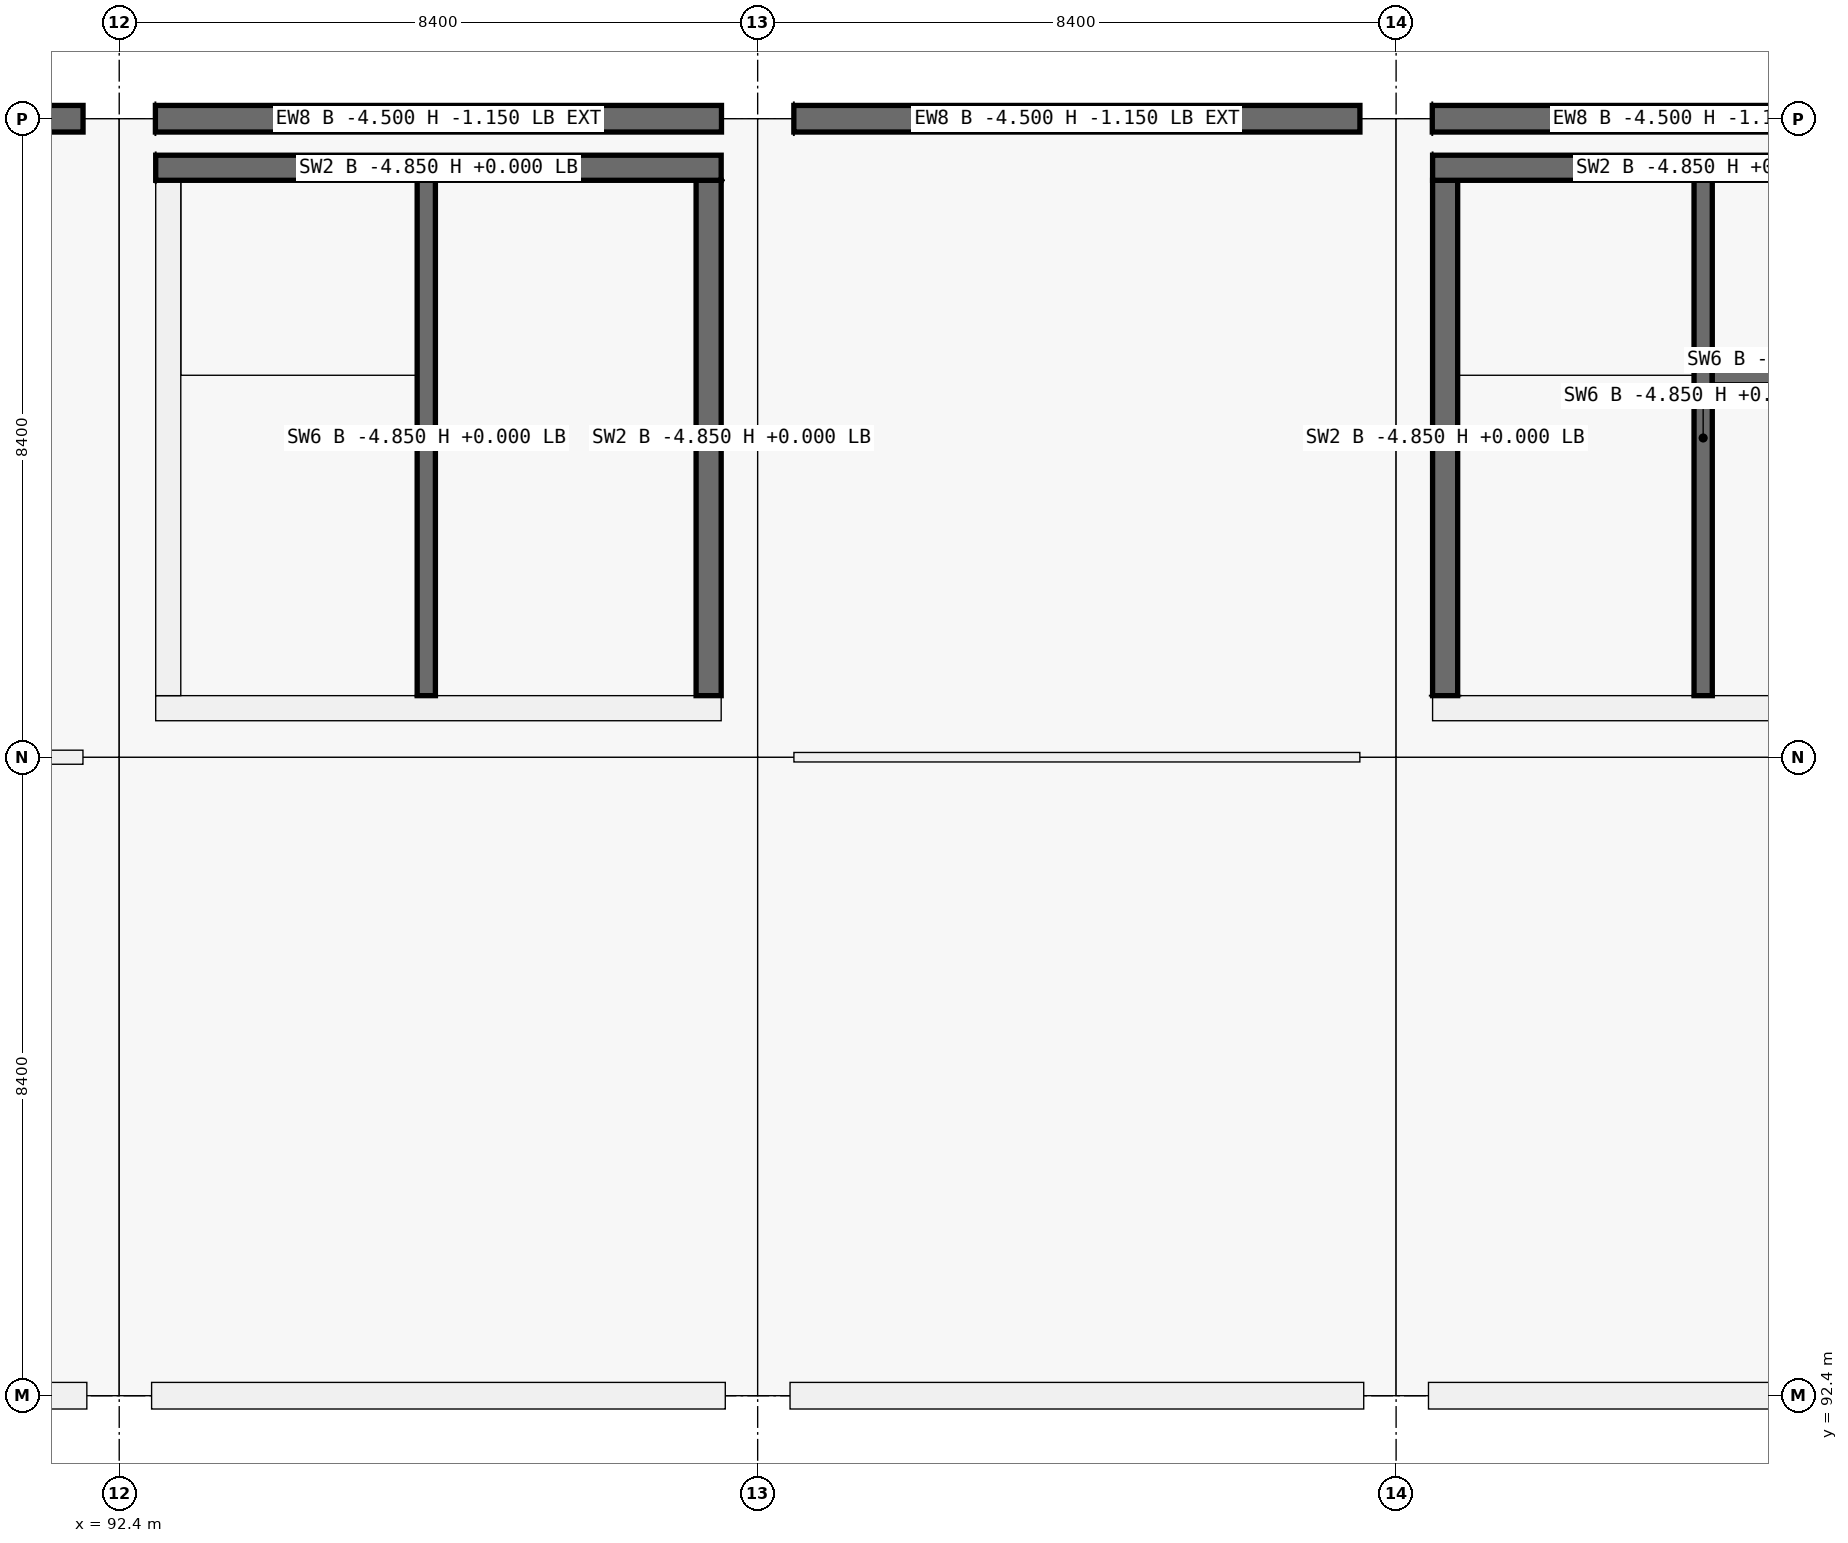
"""IFC4 building model, lengths in metres.
Left out: names, types, materials, properties, quantities, classifications, styles, units other than length and angle.
Written with IfcOpenShell. Run it as: python <this file> out.ifc"""

import sys

from ifc_helpers import new_model, si_unit, direction, frame, frame_2d, origin, origin_2d, place, context, subcontext, project, spatial, rectangle, extrude, element, fill, save


model = new_model("IFC4")
c1 = context("Model", 3, precision=1e-05, world=origin(), true_north=direction((0.0, 1.0)))
c2 = subcontext(c1, "Body", "Model", "MODEL_VIEW")
j1 = project(units=[si_unit("LENGTHUNIT", "METRE"), si_unit("PLANEANGLEUNIT", "RADIAN")], contexts=[c1])
p1 = place(None, origin())
s1 = spatial("IfcSite", under=j1, at=p1, CompositionType="ELEMENT")
p2 = place(p1, origin())
s2 = spatial("IfcBuilding", under=s1, at=p2, CompositionType="ELEMENT")
p3 = place(p2, frame((0.0, 0.0, -4.5)))
s3 = spatial("IfcBuildingStorey", under=s2, at=p3, CompositionType="ELEMENT", Elevation=-4.5)
p4 = place(p3, frame((92.4, 92.4, -0.35), z_axis=(0.0, 0.0, 1.0), x_axis=(1.0, 0.0, 0.0)))
e1 = element("IfcColumn", 1, at=p4, inside=s3, PredefinedType="COLUMN", context=c2, shape_type="SweptSolid", body=[
    extrude(rectangle(XDim=0.85, YDim=0.85, at=origin_2d()), origin(), (0.0, 0.0, 1.0), 4.5),
])
for number, where, z_axis, x_axis in (
    (2, (92.4, 100.8, -0.35), (0.0, 0.0, 1.0), (1.0, 0.0, 0.0)),
    (3, (92.4, 109.2, -0.35), (0.0, 0.0, 1.0), (1.0, 0.0, 0.0)),
):
    element("IfcColumn", number, at=place(p3, frame(where, z_axis=z_axis, x_axis=x_axis)), inside=s3, PredefinedType="COLUMN", context=c2, shape_type="SweptSolid", body=[
        extrude(rectangle(XDim=0.95, YDim=0.95, at=origin_2d()), origin(), (0.0, 0.0, 1.0), 4.85),
    ])
p5 = place(p3, frame((100.8, 92.4, -0.35), z_axis=(0.0, 0.0, 1.0), x_axis=(1.0, 0.0, 0.0)))
e4 = element("IfcColumn", 4, at=p5, inside=s3, PredefinedType="COLUMN", context=c2, shape_type="SweptSolid", body=[
    extrude(rectangle(XDim=0.85, YDim=0.85, at=origin_2d()), origin(), (0.0, 0.0, 1.0), 4.5),
])
for number, where, z_axis, x_axis in (
    (5, (100.8, 100.8, -0.35), (0.0, 0.0, 1.0), (1.0, 0.0, 0.0)),
    (6, (100.8, 109.2, -0.35), (0.0, 0.0, 1.0), (1.0, 0.0, 0.0)),
):
    element("IfcColumn", number, at=place(p3, frame(where, z_axis=z_axis, x_axis=x_axis)), inside=s3, PredefinedType="COLUMN", context=c2, shape_type="SweptSolid", body=[
        extrude(rectangle(XDim=0.95, YDim=0.95, at=origin_2d()), origin(), (0.0, 0.0, 1.0), 4.85),
    ])
p6 = place(p3, frame((109.2, 92.4, -0.35), z_axis=(0.0, 0.0, 1.0), x_axis=(1.0, 0.0, 0.0)))
e7 = element("IfcColumn", 7, at=p6, inside=s3, PredefinedType="COLUMN", context=c2, shape_type="SweptSolid", body=[
    extrude(rectangle(XDim=0.85, YDim=0.85, at=origin_2d()), origin(), (0.0, 0.0, 1.0), 4.5),
])
for number, where, z_axis, x_axis in (
    (8, (109.2, 100.8, -0.35), (0.0, 0.0, 1.0), (1.0, 0.0, 0.0)),
    (9, (109.2, 109.2, -0.35), (0.0, 0.0, 1.0), (1.0, 0.0, 0.0)),
):
    element("IfcColumn", number, at=place(p3, frame(where, z_axis=z_axis, x_axis=x_axis)), inside=s3, PredefinedType="COLUMN", context=c2, shape_type="SweptSolid", body=[
        extrude(rectangle(XDim=0.95, YDim=0.95, at=origin_2d()), origin(), (0.0, 0.0, 1.0), 4.85),
    ])
p7 = place(p3, frame((91.974, 92.4, 0.0), z_axis=(0.0, 0.0, 1.0), x_axis=(-1.0, 0.0, 0.0)))
e10 = element("IfcWall", 10, at=p7, inside=s3, PredefinedType="SOLIDWALL", context=c2, shape_type="SweptSolid", body=[
    extrude(rectangle(XDim=7.548, YDim=0.35, at=frame_2d((3.774, 0.0))), origin(), (0.0, 0.0, 1.0), 3.35),
])
p8 = place(p3, frame((84.476, 109.2, 0.0), z_axis=(0.0, 0.0, 1.0), x_axis=(1.0, 0.0, 0.0)))
e11 = element("IfcWall", 11, at=p8, inside=s3, PredefinedType="SOLIDWALL", context=c2, shape_type="SweptSolid", body=[
    extrude(rectangle(XDim=7.448, YDim=0.35, at=frame_2d((3.724, 0.0))), origin(), (0.0, 0.0, 1.0), 3.35),
])
p9 = place(p3, frame((100.374, 92.4, 0.0), z_axis=(0.0, 0.0, 1.0), x_axis=(-1.0, 0.0, 0.0)))
e12 = element("IfcWall", 12, at=p9, inside=s3, PredefinedType="SOLIDWALL", context=c2, shape_type="SweptSolid", body=[
    extrude(rectangle(XDim=7.548, YDim=0.35, at=frame_2d((3.774, 0.0))), origin(), (0.0, 0.0, 1.0), 3.35),
])
p10 = place(p3, frame((92.876, 109.2, 0.0), z_axis=(0.0, 0.0, 1.0), x_axis=(1.0, 0.0, 0.0)))
e13 = element("IfcWall", 13, at=p10, inside=s3, PredefinedType="SOLIDWALL", context=c2, shape_type="SweptSolid", body=[
    extrude(rectangle(XDim=7.448, YDim=0.35, at=frame_2d((3.724, 0.0))), origin(), (0.0, 0.0, 1.0), 3.35),
])
p11 = place(p3, frame((108.774, 92.4, 0.0), z_axis=(0.0, 0.0, 1.0), x_axis=(-1.0, 0.0, 0.0)))
e14 = element("IfcWall", 14, at=p11, inside=s3, PredefinedType="SOLIDWALL", context=c2, shape_type="SweptSolid", body=[
    extrude(rectangle(XDim=7.548, YDim=0.35, at=frame_2d((3.774, 0.0))), origin(), (0.0, 0.0, 1.0), 3.35),
])
p12 = place(p3, frame((101.276, 109.2, 0.0), z_axis=(0.0, 0.0, 1.0), x_axis=(1.0, 0.0, 0.0)))
e15 = element("IfcWall", 15, at=p12, inside=s3, PredefinedType="SOLIDWALL", context=c2, shape_type="SweptSolid", body=[
    extrude(rectangle(XDim=7.448, YDim=0.35, at=frame_2d((3.724, 0.0))), origin(), (0.0, 0.0, 1.0), 3.35),
])
p13 = place(p3, frame((117.149, 92.4, 0.0), z_axis=(0.0, 0.0, 1.0), x_axis=(-1.0, 0.0, 0.0)))
e16 = element("IfcWall", 16, at=p13, inside=s3, PredefinedType="SOLIDWALL", context=c2, shape_type="SweptSolid", body=[
    extrude(rectangle(XDim=7.523, YDim=0.35, at=frame_2d((3.761, 0.0))), origin(), (0.0, 0.0, 1.0), 3.35),
])
p14 = place(p3, frame((109.676, 109.2, 0.0), z_axis=(0.0, 0.0, 1.0), x_axis=(1.0, 0.0, 0.0)))
e17 = element("IfcWall", 17, at=p14, inside=s3, PredefinedType="SOLIDWALL", context=c2, shape_type="SweptSolid", body=[
    extrude(rectangle(XDim=7.448, YDim=0.35, at=frame_2d((3.724, 0.0))), origin(), (0.0, 0.0, 1.0), 3.35),
])
p15 = place(p3, frame((117.12, 101.445, -0.35), z_axis=(0.0, 0.0, 1.0), x_axis=(-1.0, 0.0, 0.0)))
e18 = element("IfcWall", 18, at=p15, inside=s3, PredefinedType="SHEAR", context=c2, shape_type="SweptSolid", body=[
    extrude(rectangle(XDim=7.44, YDim=0.33, at=frame_2d((3.72, 0.0))), origin(), (0.0, 0.0, 1.0), 4.85),
])
p16 = place(p15, frame((1.28, 0.0, 0.35)))
e19 = element("IfcOpeningElement", 19, at=p16, cuts=e18, PredefinedType="OPENING", context=c2, shape_type="SweptSolid", body=[
    extrude(rectangle(XDim=1.5, YDim=2.15, at=frame_2d((0.75, 1.075))), frame((0.0, 0.165, 0.0), z_axis=(0.0, -1.0, 0.0), x_axis=(1.0, 0.0, 0.0)), (0.0, 0.0, 1.0), 0.33),
])
p17 = place(p3, frame((109.845, 101.61, -0.35), z_axis=(0.0, 0.0, 1.0), x_axis=(0.0, 1.0, 0.0)))
e20 = element("IfcWall", 20, at=p17, inside=s3, PredefinedType="SHEAR", context=c2, shape_type="SweptSolid", body=[
    extrude(rectangle(XDim=6.78, YDim=0.33, at=frame_2d((3.39, 0.0))), origin(), (0.0, 0.0, 1.0), 4.85),
])
p18 = place(p3, frame((109.68, 108.555, -0.35), z_axis=(0.0, 0.0, 1.0), x_axis=(1.0, 0.0, 0.0)))
e21 = element("IfcWall", 21, at=p18, inside=s3, PredefinedType="SHEAR", context=c2, shape_type="SweptSolid", body=[
    extrude(rectangle(XDim=7.44, YDim=0.33, at=frame_2d((3.72, 0.0))), origin(), (0.0, 0.0, 1.0), 4.85),
])
p19 = place(p3, frame((113.24, 101.61, -0.35), z_axis=(0.0, 0.0, 1.0), x_axis=(0.0, 1.0, 0.0)))
e22 = element("IfcWall", 22, at=p19, inside=s3, PredefinedType="SHEAR", context=c2, shape_type="SweptSolid", body=[
    extrude(rectangle(XDim=6.78, YDim=0.24, at=frame_2d((3.39, 0.0))), origin(), (0.0, 0.0, 1.0), 4.85),
])
p20 = place(p19, frame((0.12, 0.0, 0.35)))
e23 = element("IfcOpeningElement", 23, at=p20, cuts=e22, PredefinedType="OPENING", context=c2, shape_type="SweptSolid", body=[
    extrude(rectangle(XDim=1.0, YDim=2.15, at=frame_2d((0.5, 1.075))), frame((0.0, 0.12, 0.0), z_axis=(0.0, -1.0, 0.0), x_axis=(1.0, 0.0, 0.0)), (0.0, 0.0, 1.0), 0.24),
])
p21 = place(p3, frame((113.36, 105.82, -0.35), z_axis=(0.0, 0.0, 1.0), x_axis=(1.0, 0.0, 0.0)))
e24 = element("IfcWall", 24, at=p21, inside=s3, PredefinedType="SHEAR", context=c2, shape_type="SweptSolid", body=[
    extrude(rectangle(XDim=3.43, YDim=0.24, at=frame_2d((1.715, 0.0))), origin(), (0.0, 0.0, 1.0), 4.85),
])
p22 = place(p21, frame((1.115, 0.0, 0.35)))
e25 = element("IfcOpeningElement", 25, at=p22, cuts=e24, PredefinedType="OPENING", context=c2, shape_type="SweptSolid", body=[
    extrude(rectangle(XDim=1.2, YDim=2.2, at=frame_2d((0.6, 1.1))), frame((0.0, 0.12, 0.0), z_axis=(0.0, -1.0, 0.0), x_axis=(1.0, 0.0, 0.0)), (0.0, 0.0, 1.0), 0.24),
])
p23 = place(p3, frame((100.32, 101.445, -0.35), z_axis=(0.0, 0.0, 1.0), x_axis=(-1.0, 0.0, 0.0)))
e26 = element("IfcWall", 26, at=p23, inside=s3, PredefinedType="SHEAR", context=c2, shape_type="SweptSolid", body=[
    extrude(rectangle(XDim=7.44, YDim=0.33, at=frame_2d((3.72, 0.0))), origin(), (0.0, 0.0, 1.0), 4.85),
])
p24 = place(p23, frame((1.28, 0.0, 0.35)))
e27 = element("IfcOpeningElement", 27, at=p24, cuts=e26, PredefinedType="OPENING", context=c2, shape_type="SweptSolid", body=[
    extrude(rectangle(XDim=1.5, YDim=2.15, at=frame_2d((0.75, 1.075))), frame((0.0, 0.165, 0.0), z_axis=(0.0, -1.0, 0.0), x_axis=(1.0, 0.0, 0.0)), (0.0, 0.0, 1.0), 0.33),
])
p25 = place(p3, frame((93.045, 101.61, -0.35), z_axis=(0.0, 0.0, 1.0), x_axis=(0.0, 1.0, 0.0)))
e28 = element("IfcWall", 28, at=p25, inside=s3, PredefinedType="SHEAR", context=c2, shape_type="SweptSolid", body=[
    extrude(rectangle(XDim=6.78, YDim=0.33, at=frame_2d((3.39, 0.0))), origin(), (0.0, 0.0, 1.0), 4.85),
])
p26 = place(p3, frame((92.88, 108.555, -0.35), z_axis=(0.0, 0.0, 1.0), x_axis=(1.0, 0.0, 0.0)))
e29 = element("IfcWall", 29, at=p26, inside=s3, PredefinedType="SHEAR", context=c2, shape_type="SweptSolid", body=[
    extrude(rectangle(XDim=7.44, YDim=0.33, at=frame_2d((3.72, 0.0))), origin(), (0.0, 0.0, 1.0), 4.85),
])
p27 = place(p3, frame((100.155, 108.39, -0.35), z_axis=(0.0, 0.0, 1.0), x_axis=(0.0, -1.0, 0.0)))
e30 = element("IfcWall", 30, at=p27, inside=s3, PredefinedType="SHEAR", context=c2, shape_type="SweptSolid", body=[
    extrude(rectangle(XDim=6.78, YDim=0.33, at=frame_2d((3.39, 0.0))), origin(), (0.0, 0.0, 1.0), 4.85),
])
p28 = place(p27, frame((3.94, 0.0, 0.35)))
e31 = element("IfcOpeningElement", 31, at=p28, cuts=e30, PredefinedType="OPENING", context=c2, shape_type="SweptSolid", body=[
    extrude(rectangle(XDim=1.5, YDim=2.15, at=frame_2d((0.75, 1.075))), frame((0.0, 0.165, 0.0), z_axis=(0.0, -1.0, 0.0), x_axis=(1.0, 0.0, 0.0)), (0.0, 0.0, 1.0), 0.33),
])
p29 = place(p3, frame((96.44, 101.61, -0.35), z_axis=(0.0, 0.0, 1.0), x_axis=(0.0, 1.0, 0.0)))
e32 = element("IfcWall", 32, at=p29, inside=s3, PredefinedType="SHEAR", context=c2, shape_type="SweptSolid", body=[
    extrude(rectangle(XDim=6.78, YDim=0.24, at=frame_2d((3.39, 0.0))), origin(), (0.0, 0.0, 1.0), 4.85),
])
p30 = place(p29, frame((0.12, 0.0, 0.35)))
e33 = element("IfcOpeningElement", 33, at=p30, cuts=e32, PredefinedType="OPENING", context=c2, shape_type="SweptSolid", body=[
    extrude(rectangle(XDim=1.0, YDim=2.15, at=frame_2d((0.5, 1.075))), frame((0.0, 0.12, 0.0), z_axis=(0.0, -1.0, 0.0), x_axis=(1.0, 0.0, 0.0)), (0.0, 0.0, 1.0), 0.24),
])
p31 = place(p3, frame((84.477, 100.8, 0.0), z_axis=(0.0, 0.0, 1.0), x_axis=(1.0, 0.0, 0.0)))
e34 = element("IfcWall", 34, at=p31, inside=s3, PredefinedType="PARTITIONING", context=c2, shape_type="SweptSolid", body=[
    extrude(rectangle(XDim=7.446, YDim=0.185, at=frame_2d((3.723, 0.0))), origin(), (0.0, 0.0, 1.0), 3.27),
])
p32 = place(p31, frame((3.218, 0.0, 0.0)))
e35 = element("IfcOpeningElement", 35, at=p32, cuts=e34, PredefinedType="OPENING", context=c2, shape_type="SweptSolid", body=[
    extrude(rectangle(XDim=1.01, YDim=2.12, at=frame_2d((0.505, 1.06))), frame((0.0, 0.093, 0.0), z_axis=(0.0, -1.0, 0.0), x_axis=(1.0, 0.0, 0.0)), (0.0, 0.0, 1.0), 0.185),
])
p33 = place(p3, frame((101.277, 100.8, 0.0), z_axis=(0.0, 0.0, 1.0), x_axis=(1.0, 0.0, 0.0)))
e36 = element("IfcWall", 36, at=p33, inside=s3, PredefinedType="PARTITIONING", context=c2, shape_type="SweptSolid", body=[
    extrude(rectangle(XDim=7.446, YDim=0.125, at=frame_2d((3.723, 0.0))), origin(), (0.0, 0.0, 1.0), 3.27),
])
p34 = place(p33, frame((3.238, 0.0, 0.0)))
e37 = element("IfcOpeningElement", 37, at=p34, cuts=e36, PredefinedType="OPENING", context=c2, shape_type="SweptSolid", body=[
    extrude(rectangle(XDim=0.97, YDim=2.12, at=frame_2d((0.485, 1.06))), frame((0.0, 0.062, 0.0), z_axis=(0.0, -1.0, 0.0), x_axis=(1.0, 0.0, 0.0)), (0.0, 0.0, 1.0), 0.125),
])
p35 = place(p20, origin())
e38 = element("IfcDoor", 38, at=p35, inside=s3, OperationType="SINGLE_SWING_LEFT", PredefinedType="DOOR", context=c2, shape_type="SweptSolid", body=[
    extrude(rectangle(XDim=1.0, YDim=2.15, at=frame_2d((0.5, 1.075))), frame((0.0, 0.025, 0.0), z_axis=(0.0, -1.0, 0.0), x_axis=(1.0, 0.0, 0.0)), (0.0, 0.0, 1.0), 0.05),
])
fill(e23, e38)
p36 = place(p30, origin())
e39 = element("IfcDoor", 39, at=p36, inside=s3, OperationType="SINGLE_SWING_LEFT", PredefinedType="DOOR", context=c2, shape_type="SweptSolid", body=[
    extrude(rectangle(XDim=1.0, YDim=2.15, at=frame_2d((0.5, 1.075))), frame((0.0, 0.025, 0.0), z_axis=(0.0, -1.0, 0.0), x_axis=(1.0, 0.0, 0.0)), (0.0, 0.0, 1.0), 0.05),
])
fill(e33, e39)
p37 = place(p28, origin())
e40 = element("IfcDoor", 40, at=p37, inside=s3, OperationType="DOUBLE_DOOR_SINGLE_SWING", PredefinedType="DOOR", context=c2, shape_type="SweptSolid", body=[
    extrude(rectangle(XDim=1.5, YDim=2.15, at=frame_2d((0.75, 1.075))), frame((0.0, 0.025, 0.0), z_axis=(0.0, -1.0, 0.0), x_axis=(1.0, 0.0, 0.0)), (0.0, 0.0, 1.0), 0.05),
])
fill(e31, e40)
p38 = place(p24, origin())
e41 = element("IfcDoor", 41, at=p38, inside=s3, OperationType="DOUBLE_DOOR_SINGLE_SWING", PredefinedType="DOOR", context=c2, shape_type="SweptSolid", body=[
    extrude(rectangle(XDim=1.5, YDim=2.15, at=frame_2d((0.75, 1.075))), frame((0.0, 0.025, 0.0), z_axis=(0.0, -1.0, 0.0), x_axis=(1.0, 0.0, 0.0)), (0.0, 0.0, 1.0), 0.05),
])
fill(e27, e41)
p39 = place(p34, origin())
e42 = element("IfcDoor", 42, at=p39, inside=s3, OperationType="SINGLE_SWING_LEFT", PredefinedType="DOOR", context=c2, shape_type="SweptSolid", body=[
    extrude(rectangle(XDim=0.97, YDim=2.12, at=frame_2d((0.485, 1.06))), frame((0.0, 0.025, 0.0), z_axis=(0.0, -1.0, 0.0), x_axis=(1.0, 0.0, 0.0)), (0.0, 0.0, 1.0), 0.05),
])
fill(e37, e42)
save(model, sys.argv[1])
